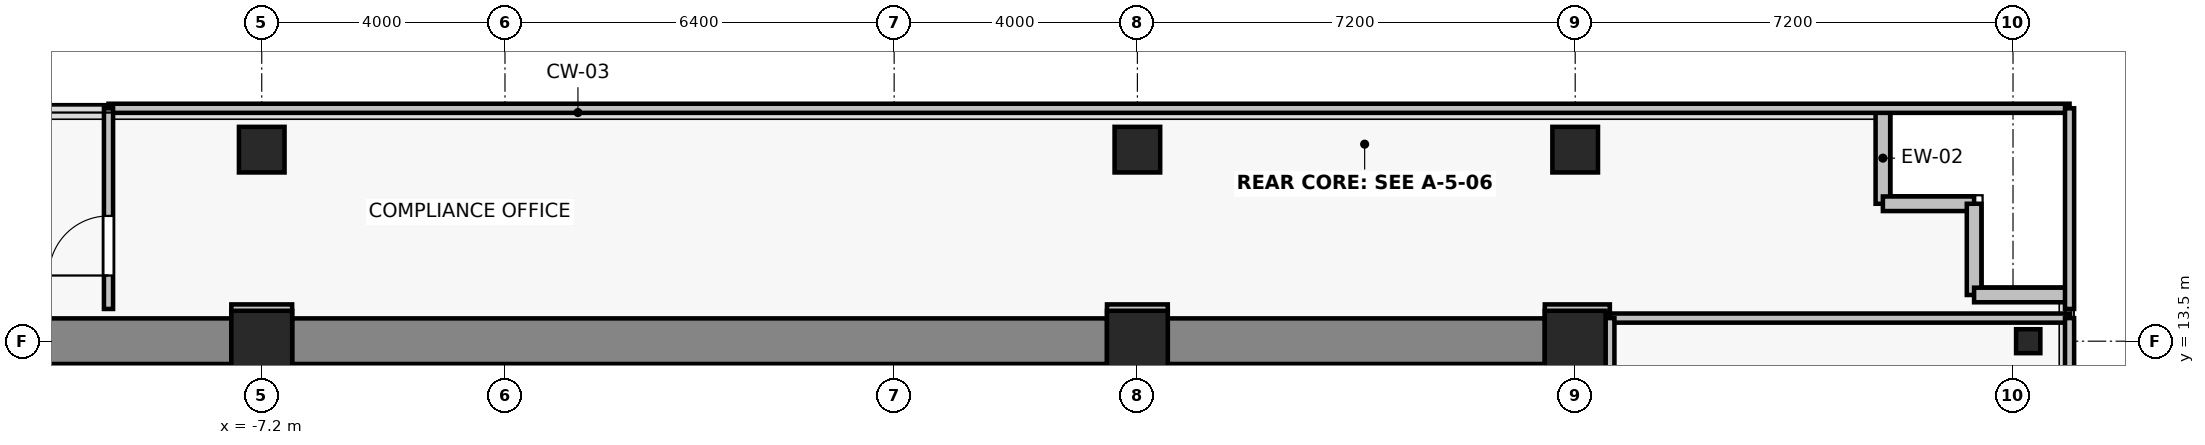
"""IFC4 building model, lengths in metres.
Left out: names, types, materials, properties, quantities, classifications, styles, units other than length and angle.
Written with IfcOpenShell. Run it as: python <this file> out.ifc"""

import sys

from ifc_helpers import new_model, si_unit, direction, frame, frame_2d, origin, origin_2d, place, context, subcontext, project, spatial, rectangle, i_section, extrude, source, transform, mapped, element, fill, save


model = new_model("IFC4")
c1 = context("Model", 3, precision=1e-05, world=origin(), true_north=direction((0.0, 1.0)))
c2 = subcontext(c1, "Body", "Model", "MODEL_VIEW")
j1 = project(units=[si_unit("LENGTHUNIT", "METRE"), si_unit("PLANEANGLEUNIT", "RADIAN")], contexts=[c1])
p1 = place(None, origin())
s1 = spatial("IfcSite", under=j1, at=p1, CompositionType="ELEMENT")
p2 = place(p1, origin())
s2 = spatial("IfcBuilding", under=s1, at=p2, CompositionType="ELEMENT")
p3 = place(p2, frame((0.0, 0.0, 162.7)))
s3 = spatial("IfcBuildingStorey", under=s2, at=p3, CompositionType="ELEMENT", Elevation=162.7)
for number, where, z_axis, x_axis in (
    (1, (-7.2, 13.5, 0.0), (0.0, 0.0, 1.0), (1.0, 0.0, 0.0)),
    (2, (7.2, 13.5, 0.0), (0.0, 0.0, 1.0), (1.0, 0.0, 0.0)),
    (3, (14.4, 13.5, 0.0), (0.0, 0.0, 1.0), (1.0, 0.0, 0.0)),
):
    element("IfcColumn", number, at=place(p3, frame(where, z_axis=z_axis, x_axis=x_axis)), inside=s3, PredefinedType="COLUMN", context=c2, shape_type="SweptSolid", body=[
        extrude(rectangle(XDim=1.0, YDim=1.0, at=origin_2d()), origin(), (0.0, 0.0, 1.0), 3.3),
    ])
for number, where, z_axis, x_axis in (
    (4, (-7.2, 16.65, 0.0), (0.0, 0.0, 1.0), (1.0, 0.0, 0.0)),
    (5, (7.2, 16.65, 0.0), (0.0, 0.0, 1.0), (1.0, 0.0, 0.0)),
    (6, (14.4, 16.65, 0.0), (0.0, 0.0, 1.0), (1.0, 0.0, 0.0)),
):
    element("IfcColumn", number, at=place(p3, frame(where, z_axis=z_axis, x_axis=x_axis)), inside=s3, PredefinedType="COLUMN", context=c2, shape_type="SweptSolid", body=[
        extrude(rectangle(XDim=0.75, YDim=0.75, at=origin_2d()), origin(), (0.0, 0.0, 1.0), 3.3),
    ])
p4 = place(p3, frame((21.85, 13.5, 0.0), z_axis=(0.0, 0.0, 1.0), x_axis=(1.0, 0.0, 0.0)))
e7 = element("IfcColumn", 7, at=p4, inside=s3, PredefinedType="COLUMN", context=c2, shape_type="SweptSolid", body=[
    extrude(i_section(OverallWidth=0.399, OverallDepth=0.394, WebThickness=0.023, FlangeThickness=0.037, FilletRadius=0.015, at=origin_2d()), origin(), (0.0, 0.0, 1.0), 3.3),
])
p5 = place(p3, frame((-13.9, 13.5, 0.0), z_axis=(0.0, 0.0, 1.0), x_axis=(1.0, 0.0, 0.0)))
e8 = element("IfcWall", 8, at=p5, inside=s3, PredefinedType="SHEAR", context=c2, shape_type="SweptSolid", body=[
    extrude(rectangle(XDim=6.2, YDim=0.75, at=frame_2d((3.1, 0.0))), origin(), (0.0, 0.0, 1.0), 3.075),
])
p6 = place(p3, frame((-6.7, 13.5, 0.0), z_axis=(0.0, 0.0, 1.0), x_axis=(1.0, 0.0, 0.0)))
e9 = element("IfcWall", 9, at=p6, inside=s3, PredefinedType="SHEAR", context=c2, shape_type="SweptSolid", body=[
    extrude(rectangle(XDim=13.4, YDim=0.75, at=frame_2d((6.7, 0.0))), origin(), (0.0, 0.0, 1.0), 3.075),
])
p7 = place(p3, frame((7.7, 13.5, 0.0), z_axis=(0.0, 0.0, 1.0), x_axis=(1.0, 0.0, 0.0)))
e10 = element("IfcWall", 10, at=p7, inside=s3, PredefinedType="SHEAR", context=c2, shape_type="SweptSolid", body=[
    extrude(rectangle(XDim=6.2, YDim=0.75, at=frame_2d((3.1, 0.0))), origin(), (0.0, 0.0, 1.0), 3.075),
])
for number, where, z_axis, x_axis in (
    (11, (19.46, 15.76, 0.0), (0.0, 0.0, 1.0), (0.0, 1.0, 0.0)),
    (12, (20.96, 15.76, 0.0), (0.0, 0.0, 1.0), (-1.0, 0.0, 0.0)),
    (13, (20.96, 14.26, 0.0), (0.0, 0.0, 1.0), (0.0, 1.0, 0.0)),
    (14, (22.46, 14.26, 0.0), (0.0, 0.0, 1.0), (-1.0, 0.0, 0.0)),
):
    element("IfcWall", number, at=place(p3, frame(where, z_axis=z_axis, x_axis=x_axis)), inside=s3, PredefinedType="SOLIDWALL", context=c2, shape_type="SweptSolid", body=[
        extrude(rectangle(XDim=1.5, YDim=0.24, at=frame_2d((0.75, 0.0))), origin(), (0.0, 0.0, 1.0), 3.075),
    ])
p8 = place(p3, frame((14.97, 13.88, 0.0), z_axis=(0.0, 0.0, 1.0), x_axis=(1.0, 0.0, 0.0)))
e15 = element("IfcWall", 15, at=p8, inside=s3, PredefinedType="PARTITIONING", context=c2, shape_type="SweptSolid", body=[
    extrude(rectangle(XDim=7.56, YDim=0.15, at=frame_2d((3.78, 0.0))), origin(), (0.0, 0.0, 1.0), 3.075),
])
p9 = place(p3, frame((14.97, 13.0, 0.0), z_axis=(0.0, 0.0, 1.0), x_axis=(0.0, 1.0, 0.0)))
e16 = element("IfcWall", 16, at=p9, inside=s3, PredefinedType="PARTITIONING", context=c2, shape_type="SweptSolid", body=[
    extrude(rectangle(XDim=0.88, YDim=0.15, at=frame_2d((0.44, 0.0))), origin(), (0.0, 0.0, 1.0), 2.565),
])
p10 = place(p3, frame((22.53, 13.88, 0.0), z_axis=(0.0, 0.0, 1.0), x_axis=(0.0, -1.0, 0.0)))
e17 = element("IfcWall", 17, at=p10, inside=s3, PredefinedType="PARTITIONING", context=c2, shape_type="SweptSolid", body=[
    extrude(rectangle(XDim=15.65, YDim=0.15, at=frame_2d((7.825, 0.0))), origin(), (0.0, 0.0, 1.0), 3.075),
])
for number, where, z_axis, x_axis in (
    (18, (-6.7, 14.03, 0.0), (0.0, 0.0, 1.0), (-1.0, 0.0, 0.0)),
    (19, (7.7, 14.03, 0.0), (0.0, 0.0, 1.0), (-1.0, 0.0, 0.0)),
):
    element("IfcWall", number, at=place(p3, frame(where, z_axis=z_axis, x_axis=x_axis)), inside=s3, PredefinedType="PARTITIONING", context=c2, shape_type="SweptSolid", body=[
        extrude(rectangle(XDim=1.0, YDim=0.15, at=frame_2d((0.5, 0.0))), origin(), (0.0, 0.0, 1.0), 2.565),
    ])
p11 = place(p3, frame((14.97, 14.03, 0.0), z_axis=(0.0, 0.0, 1.0), x_axis=(-1.0, 0.0, 0.0)))
e20 = element("IfcWall", 20, at=p11, inside=s3, PredefinedType="PARTITIONING", context=c2, shape_type="SweptSolid", body=[
    extrude(rectangle(XDim=1.07, YDim=0.15, at=frame_2d((0.535, 0.0))), origin(), (0.0, 0.0, 1.0), 2.565),
])
p12 = place(p3, frame((-9.72, 17.33, 0.0), z_axis=(0.0, 0.0, 1.0), x_axis=(1.0, 0.0, 0.0)))
e21 = element("IfcWall", 21, at=p12, inside=s3, PredefinedType="PARTITIONING", context=c2, shape_type="SweptSolid", body=[
    extrude(rectangle(XDim=32.25, YDim=0.15, at=frame_2d((16.125, 0.0))), origin(), (0.0, 0.0, 1.0), 3.075),
])
p13 = place(p3, frame((-9.72, 14.03, 0.0), z_axis=(0.0, 0.0, 1.0), x_axis=(0.0, 1.0, 0.0)))
e22 = element("IfcWall", 22, at=p13, inside=s3, PredefinedType="PARTITIONING", context=c2, shape_type="SweptSolid", body=[
    extrude(rectangle(XDim=3.3, YDim=0.15, at=frame_2d((1.65, 0.0))), origin(), (0.0, 0.0, 1.0), 2.565),
])
p14 = place(p13, frame((0.55, 0.0, 0.0)))
e23 = element("IfcOpeningElement", 23, at=p14, cuts=e22, PredefinedType="OPENING", context=c2, shape_type="SweptSolid", body=[
    extrude(rectangle(XDim=0.98, YDim=2.15, at=frame_2d((0.49, 1.075))), frame((0.0, 0.085, 0.0), z_axis=(0.0, -1.0, 0.0), x_axis=(1.0, 0.0, 0.0)), (0.0, 0.0, 1.0), 0.17),
])
p15 = place(p3, frame((22.53, 17.33, 0.0), z_axis=(0.0, 0.0, 1.0), x_axis=(0.0, -1.0, 0.0)))
e24 = element("IfcWall", 24, at=p15, inside=s3, PredefinedType="PARTITIONING", context=c2, shape_type="SweptSolid", body=[
    extrude(rectangle(XDim=3.3, YDim=0.15, at=frame_2d((1.65, 0.0))), origin(), (0.0, 0.0, 1.0), 3.075),
])
m1 = source(origin(), c2, "Body", "SweptSolid", [
    extrude(rectangle(XDim=0.98, YDim=2.15, at=frame_2d((0.49, 1.075))), frame((0.0, 0.025, 0.0), z_axis=(0.0, -1.0, 0.0), x_axis=(1.0, 0.0, 0.0)), (0.0, 0.0, 1.0), 0.05),
])
p16 = place(p14, origin())
e25 = element("IfcDoor", 25, at=p16, inside=s3, OperationType="SINGLE_SWING_LEFT", PredefinedType="DOOR", context=c2, shape_type="MappedRepresentation", body=[
    mapped(m1, transform((0.0, 0.0, 0.0), x_axis=(1.0, 0.0, 0.0), y_axis=(0.0, 1.0, 0.0), z_axis=(0.0, 0.0, 1.0), scale=1.0)),
])
fill(e23, e25)
save(model, sys.argv[1])
